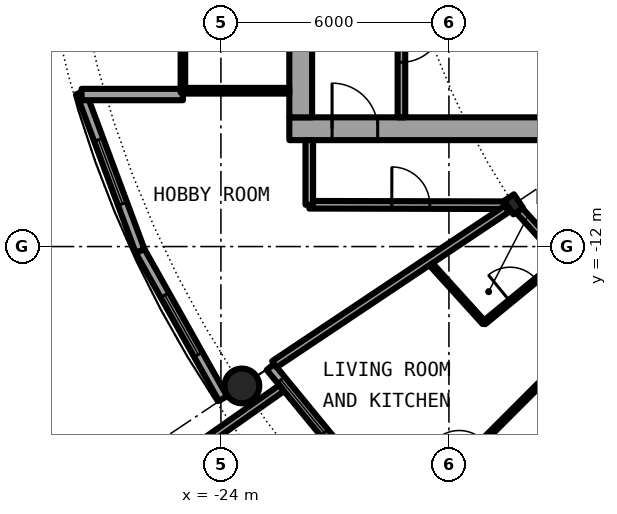
"""IFC4 building model, lengths in metres.
Left out: names, types, materials, properties, quantities, classifications, styles, units other than length and angle.
Written with IfcOpenShell. Run it as: python <this file> out.ifc"""

import sys

from ifc_helpers import new_model, si_unit, direction, frame, frame_2d, origin, origin_2d, place, context, subcontext, project, spatial, rectangle, hollow_circle, i_section, extrude, element, fill, save


model = new_model("IFC4")
c1 = context("Model", 3, precision=1e-05, world=origin(), true_north=direction((0.0, 1.0)))
c2 = subcontext(c1, "Body", "Model", "MODEL_VIEW")
j1 = project(units=[si_unit("LENGTHUNIT", "METRE"), si_unit("PLANEANGLEUNIT", "RADIAN")], contexts=[c1])
p1 = place(None, origin())
s1 = spatial("IfcSite", under=j1, at=p1, CompositionType="ELEMENT")
p2 = place(p1, origin())
s2 = spatial("IfcBuilding", under=s1, at=p2, CompositionType="ELEMENT")
p3 = place(p2, frame((0.0, 0.0, 117.75)))
s3 = spatial("IfcBuildingStorey", under=s2, at=p3, CompositionType="ELEMENT", Elevation=117.75)
p4 = place(p3, frame((-23.448, -15.667, 0.0), z_axis=(0.0, 0.0, 1.0), x_axis=(1.0, 0.0, 0.0)))
e1 = element("IfcColumn", 1, at=p4, inside=s3, PredefinedType="COLUMN", context=c2, shape_type="SweptSolid", body=[
    extrude(hollow_circle(Radius=0.457, WallThickness=0.04, at=origin_2d()), origin(), (0.0, 0.0, 1.0), 3.05),
])
p5 = place(p3, frame((-16.297, -10.889, 0.0), z_axis=(0.0, 0.0, 1.0), x_axis=(-0.831469612303, -0.55557023302, 0.0)))
e2 = element("IfcColumn", 2, at=p5, inside=s3, PredefinedType="COLUMN", context=c2, shape_type="SweptSolid", body=[
    extrude(i_section(OverallWidth=0.307, OverallDepth=0.432, WebThickness=0.021, FlangeThickness=0.04, FilletRadius=0.027, at=origin_2d()), origin(), (0.0, 0.0, 1.0), 3.05),
])
p6 = place(p3, frame((-22.699, -15.167, 0.0), z_axis=(0.0, 0.0, 1.0), x_axis=(0.634382322723, -0.773019449054, 0.0)))
e3 = element("IfcWall", 3, at=p6, inside=s3, PredefinedType="SOLIDWALL", context=c2, shape_type="SweptSolid", body=[
    extrude(rectangle(XDim=5.352, YDim=0.25, at=frame_2d((2.676, 0.0))), origin(), (0.0, 0.0, 1.0), 2.7),
])
p7 = place(p6, frame((0.441, 0.0, 0.3)))
e4 = element("IfcOpeningElement", 4, at=p7, cuts=e3, PredefinedType="OPENING", context=c2, shape_type="SweptSolid", body=[
    extrude(rectangle(XDim=1.8, YDim=2.1, at=frame_2d((0.9, 1.05))), frame((0.0, 0.135, 0.0), z_axis=(0.0, -1.0, 0.0), x_axis=(1.0, 0.0, 0.0)), (0.0, 0.0, 1.0), 0.27),
])
p8 = place(p6, frame((3.51, 0.0, 0.0)))
e5 = element("IfcOpeningElement", 5, at=p8, cuts=e3, PredefinedType="OPENING", context=c2, shape_type="SweptSolid", body=[
    extrude(rectangle(XDim=1.0, YDim=2.2, at=frame_2d((0.5, 1.1))), frame((0.0, 0.135, 0.0), z_axis=(0.0, -1.0, 0.0), x_axis=(1.0, 0.0, 0.0)), (0.0, 0.0, 1.0), 0.27),
])
p9 = place(p3, frame((-22.402, -15.726, -0.03), z_axis=(0.0, 0.0, 1.0), x_axis=(-0.818275399393, -0.574826383135, 0.0)))
e6 = element("IfcWall", 6, at=p9, inside=s3, PredefinedType="SOLIDWALL", context=c2, shape_type="SweptSolid", body=[
    extrude(rectangle(XDim=2.929, YDim=0.2, at=frame_2d((1.465, 0.0))), origin(), (0.0, 0.0, 1.0), 2.73),
])
p10 = place(p3, frame((-27.682, -7.945, 0.0), z_axis=(0.0, 0.0, 1.0), x_axis=(0.349247811493, -0.937030397675, 0.0)))
e7 = element("IfcWall", 7, at=p10, inside=s3, PredefinedType="SOLIDWALL", context=c2, shape_type="SweptSolid", body=[
    extrude(rectangle(XDim=4.452, YDim=0.25, at=frame_2d((2.226, 0.0))), origin(), (0.0, 0.0, 1.0), 2.7),
])
p11 = place(p10, frame((1.327, 0.0, 0.3)))
e8 = element("IfcOpeningElement", 8, at=p11, cuts=e7, PredefinedType="OPENING", context=c2, shape_type="SweptSolid", body=[
    extrude(rectangle(XDim=1.8, YDim=2.1, at=frame_2d((0.9, 1.05))), frame((0.0, 0.135, 0.0), z_axis=(0.0, -1.0, 0.0), x_axis=(1.0, 0.0, 0.0)), (0.0, 0.0, 1.0), 0.27),
])
p12 = place(p3, frame((-26.127, -12.117, 0.0), z_axis=(0.0, 0.0, 1.0), x_axis=(0.489696356642, -0.871893042919, 0.0)))
e9 = element("IfcWall", 9, at=p12, inside=s3, PredefinedType="SOLIDWALL", context=c2, shape_type="SweptSolid", body=[
    extrude(rectangle(XDim=4.454, YDim=0.25, at=frame_2d((2.227, 0.0))), origin(), (0.0, 0.0, 1.0), 2.7),
])
p13 = place(p12, frame((1.327, 0.0, 0.3)))
e10 = element("IfcOpeningElement", 10, at=p13, cuts=e9, PredefinedType="OPENING", context=c2, shape_type="SweptSolid", body=[
    extrude(rectangle(XDim=1.8, YDim=2.1, at=frame_2d((0.9, 1.05))), frame((0.0, 0.135, 0.0), z_axis=(0.0, -1.0, 0.0), x_axis=(1.0, 0.0, 0.0)), (0.0, 0.0, 1.0), 0.27),
])
p14 = place(p3, frame((-25.0, -8.0, 0.0), z_axis=(0.0, 0.0, 1.0), x_axis=(-1.0, 0.0, 0.0)))
e11 = element("IfcWall", 11, at=p14, inside=s3, PredefinedType="SOLIDWALL", context=c2, shape_type="SweptSolid", body=[
    extrude(rectangle(XDim=2.667, YDim=0.3, at=frame_2d((1.333, 0.0))), origin(), (0.0, 0.0, 1.0), 2.7),
])
p15 = place(p3, frame((-22.2, -8.9, 0.0), z_axis=(0.0, 0.0, 1.0), x_axis=(1.0, 0.0, 0.0)))
e12 = element("IfcWall", 12, at=p15, inside=s3, PredefinedType="SHEAR", context=c2, shape_type="SweptSolid", body=[
    extrude(rectangle(XDim=13.8, YDim=0.6, at=frame_2d((6.9, 0.0))), origin(), (0.0, 0.0, 1.0), 3.05),
])
p16 = place(p15, frame((1.125, 0.0, 0.0)))
e13 = element("IfcOpeningElement", 13, at=p16, cuts=e12, PredefinedType="OPENING", context=c2, shape_type="SweptSolid", body=[
    extrude(rectangle(XDim=1.2, YDim=2.3, at=frame_2d((0.6, 1.15))), frame((0.0, 0.31, 0.0), z_axis=(0.0, -1.0, 0.0), x_axis=(1.0, 0.0, 0.0)), (0.0, 0.0, 1.0), 0.62),
])
p17 = place(p3, frame((-21.9, -8.6, 0.0), z_axis=(0.0, 0.0, 1.0), x_axis=(0.0, 1.0, 0.0)))
e14 = element("IfcWall", 14, at=p17, inside=s3, PredefinedType="SHEAR", context=c2, shape_type="SweptSolid", body=[
    extrude(rectangle(XDim=17.2, YDim=0.6, at=frame_2d((8.6, 0.0))), origin(), (0.0, 0.0, 1.0), 3.05),
])
p18 = place(p17, frame((7.7, 0.0, 0.0)))
e15 = element("IfcOpeningElement", 15, at=p18, cuts=e14, PredefinedType="OPENING", context=c2, shape_type="SweptSolid", body=[
    extrude(rectangle(XDim=1.8, YDim=2.3, at=frame_2d((0.9, 1.15))), frame((0.0, 0.31, 0.0), z_axis=(0.0, -1.0, 0.0), x_axis=(1.0, 0.0, 0.0)), (0.0, 0.0, 1.0), 0.62),
])
p19 = place(p3, frame((-19.25, -1.575, 0.0), z_axis=(0.0, 0.0, 1.0), x_axis=(0.0, -1.0, 0.0)))
e16 = element("IfcWall", 16, at=p19, inside=s3, PredefinedType="SOLIDWALL", context=c2, shape_type="SweptSolid", body=[
    extrude(rectangle(XDim=7.025, YDim=0.2, at=frame_2d((3.513, 0.0))), origin(), (0.0, 0.0, 1.0), 2.7),
])
p20 = place(p19, frame((4.475, 0.0, 0.0)))
e17 = element("IfcOpeningElement", 17, at=p20, cuts=e16, PredefinedType="OPENING", context=c2, shape_type="SweptSolid", body=[
    extrude(rectangle(XDim=1.1, YDim=2.3, at=frame_2d((0.55, 1.15))), frame((0.0, 0.11, 0.0), z_axis=(0.0, -1.0, 0.0), x_axis=(1.0, 0.0, 0.0)), (0.0, 0.0, 1.0), 0.22),
])
p21 = place(p3, frame((-22.2, -7.9, 0.0), z_axis=(0.0, 0.0, 1.0), x_axis=(-1.0, 0.0, 0.0)))
e18 = element("IfcWall", 18, at=p21, inside=s3, PredefinedType="PARTITIONING", context=c2, shape_type="SweptSolid", body=[
    extrude(rectangle(XDim=2.74, YDim=0.15, at=frame_2d((1.37, 0.0))), origin(), (0.0, 0.0, 1.0), 2.7),
])
p22 = place(p3, frame((-25.0, 7.95, 0.0), z_axis=(0.0, 0.0, 1.0), x_axis=(0.0, -1.0, 0.0)))
e19 = element("IfcWall", 19, at=p22, inside=s3, PredefinedType="PARTITIONING", context=c2, shape_type="SweptSolid", body=[
    extrude(rectangle(XDim=15.9, YDim=0.12, at=frame_2d((7.95, 0.0))), origin(), (0.0, 0.0, 1.0), 2.7),
])
p23 = place(p22, frame((0.95, 0.0, 0.1)))
e20 = element("IfcOpeningElement", 20, at=p23, cuts=e19, PredefinedType="OPENING", context=c2, shape_type="SweptSolid", body=[
    extrude(rectangle(XDim=14.0, YDim=2.35, at=frame_2d((7.0, 1.175))), frame((0.0, 0.07, 0.0), z_axis=(0.0, -1.0, 0.0), x_axis=(1.0, 0.0, 0.0)), (0.0, 0.0, 1.0), 0.14),
])
p24 = place(p3, frame((-18.542, -12.389, 0.0), z_axis=(0.0, 0.0, 1.0), x_axis=(0.671396556615, -0.741098282123, 0.0)))
e21 = element("IfcWall", 21, at=p24, inside=s3, PredefinedType="PARTITIONING", context=c2, shape_type="SweptSolid", body=[
    extrude(rectangle(XDim=2.182, YDim=0.1, at=frame_2d((1.091, 0.0))), origin(), (0.0, 0.0, 1.0), 2.7),
])
p25 = place(p3, frame((-16.192, -11.004, 0.0), z_axis=(0.0, 0.0, 1.0), x_axis=(0.671481997275, -0.741020868354, 0.0)))
e22 = element("IfcWall", 22, at=p25, inside=s3, PredefinedType="PARTITIONING", context=c2, shape_type="SweptSolid", body=[
    extrude(rectangle(XDim=5.596, YDim=0.2, at=frame_2d((2.798, 0.0))), origin(), (0.0, 0.0, 1.0), 2.39),
])
p26 = place(p25, frame((3.179, 0.0, 0.0)))
e23 = element("IfcOpeningElement", 23, at=p26, cuts=e22, PredefinedType="OPENING", context=c2, shape_type="SweptSolid", body=[
    extrude(rectangle(XDim=1.0, YDim=2.3, at=frame_2d((0.5, 1.15))), frame((0.0, 0.11, 0.0), z_axis=(0.0, -1.0, 0.0), x_axis=(1.0, 0.0, 0.0)), (0.0, 0.0, 1.0), 0.22),
])
p27 = place(p3, frame((-21.675, -10.9, 0.0), z_axis=(0.0, 0.0, 1.0), x_axis=(0.999997173357, -0.002377662213, 0.0)))
e24 = element("IfcWall", 24, at=p27, inside=s3, PredefinedType="PARTITIONING", context=c2, shape_type="SweptSolid", body=[
    extrude(rectangle(XDim=5.134, YDim=0.2, at=frame_2d((2.567, 0.0))), origin(), (0.0, 0.0, 1.0), 2.7),
])
p28 = place(p27, frame((2.171, 0.0, 0.0)))
e25 = element("IfcOpeningElement", 25, at=p28, cuts=e24, PredefinedType="OPENING", context=c2, shape_type="SweptSolid", body=[
    extrude(rectangle(XDim=1.0, YDim=2.3, at=frame_2d((0.5, 1.15))), frame((0.0, 0.11, 0.0), z_axis=(0.0, -1.0, 0.0), x_axis=(1.0, 0.0, 0.0)), (0.0, 0.0, 1.0), 0.22),
])
p29 = place(p3, frame((-22.595, -15.097, 0.0), z_axis=(0.0, 0.0, 1.0), x_axis=(0.831467903109, 0.555572791, 0.0)))
e26 = element("IfcWall", 26, at=p29, inside=s3, PredefinedType="PARTITIONING", context=c2, shape_type="SweptSolid", body=[
    extrude(rectangle(XDim=7.358, YDim=0.2, at=frame_2d((3.679, 0.0))), origin(), (0.0, 0.0, 1.0), 2.7),
])
p30 = place(p3, frame((-19.21, -19.222, 0.0), z_axis=(0.0, 0.0, 1.0), x_axis=(0.706914880313, 0.707298629994, 0.0)))
e27 = element("IfcWall", 27, at=p30, inside=s3, PredefinedType="PARTITIONING", context=c2, shape_type="SweptSolid", body=[
    extrude(rectangle(XDim=5.09, YDim=0.1, at=frame_2d((2.545, 0.0))), origin(), (0.0, 0.0, 1.0), 2.7),
])
p31 = place(p30, frame((2.095, 0.0, 0.0)))
e28 = element("IfcOpeningElement", 28, at=p31, cuts=e27, PredefinedType="OPENING", context=c2, shape_type="SweptSolid", body=[
    extrude(rectangle(XDim=0.9, YDim=2.3, at=frame_2d((0.45, 1.15))), frame((0.0, 0.06, 0.0), z_axis=(0.0, -1.0, 0.0), x_axis=(1.0, 0.0, 0.0)), (0.0, 0.0, 1.0), 0.12),
])
p32 = place(p3, frame((-17.24, -21.007, 0.0), z_axis=(0.0, 0.0, 1.0), x_axis=(0.634381303318, 0.773020285633, 0.0)))
e29 = element("IfcWall", 29, at=p32, inside=s3, PredefinedType="PARTITIONING", context=c2, shape_type="SweptSolid", body=[
    extrude(rectangle(XDim=7.576, YDim=0.2, at=frame_2d((3.788, 0.0))), origin(), (0.0, 0.0, 1.0), 2.7),
])
p33 = place(p3, frame((-17.077, -14.006, 0.0), z_axis=(0.0, 0.0, 1.0), x_axis=(0.77319617123, 0.634166918717, 0.0)))
e30 = element("IfcWall", 30, at=p33, inside=s3, PredefinedType="PARTITIONING", context=c2, shape_type="SweptSolid", body=[
    extrude(rectangle(XDim=2.675, YDim=0.1, at=frame_2d((1.337, 0.0))), origin(), (0.0, 0.0, 1.0), 2.7),
])
p34 = place(p33, frame((0.887, 0.0, 0.0)))
e31 = element("IfcOpeningElement", 31, at=p34, cuts=e30, PredefinedType="OPENING", context=c2, shape_type="SweptSolid", body=[
    extrude(rectangle(XDim=0.9, YDim=2.3, at=frame_2d((0.45, 1.15))), frame((0.0, 0.06, 0.0), z_axis=(0.0, -1.0, 0.0), x_axis=(1.0, 0.0, 0.0)), (0.0, 0.0, 1.0), 0.12),
])
p35 = place(p3, frame((-21.675, -10.9, 0.0), z_axis=(0.0, 0.0, 1.0), x_axis=(0.0, 1.0, 0.0)))
e32 = element("IfcWall", 32, at=p35, inside=s3, PredefinedType="PARTITIONING", context=c2, shape_type="SweptSolid", body=[
    extrude(rectangle(XDim=1.7, YDim=0.2, at=frame_2d((0.85, 0.0))), origin(), (0.0, 0.0, 1.0), 2.7),
])
p36 = place(p7, origin())
e33 = element("IfcWindow", 33, at=p36, inside=s3, PartitioningType="SINGLE_PANEL", PredefinedType="WINDOW", context=c2, shape_type="SweptSolid", body=[
    extrude(rectangle(XDim=1.8, YDim=2.1, at=frame_2d((0.9, 1.05))), frame((0.0, 0.03, 0.0), z_axis=(0.0, -1.0, 0.0), x_axis=(1.0, 0.0, 0.0)), (0.0, 0.0, 1.0), 0.06),
])
fill(e4, e33)
p37 = place(p11, origin())
e34 = element("IfcWindow", 34, at=p37, inside=s3, PartitioningType="SINGLE_PANEL", PredefinedType="WINDOW", context=c2, shape_type="SweptSolid", body=[
    extrude(rectangle(XDim=1.8, YDim=2.1, at=frame_2d((0.9, 1.05))), frame((0.0, 0.03, 0.0), z_axis=(0.0, -1.0, 0.0), x_axis=(1.0, 0.0, 0.0)), (0.0, 0.0, 1.0), 0.06),
])
fill(e8, e34)
p38 = place(p13, origin())
e35 = element("IfcWindow", 35, at=p38, inside=s3, PartitioningType="SINGLE_PANEL", PredefinedType="WINDOW", context=c2, shape_type="SweptSolid", body=[
    extrude(rectangle(XDim=1.8, YDim=2.1, at=frame_2d((0.9, 1.05))), frame((0.0, 0.03, 0.0), z_axis=(0.0, -1.0, 0.0), x_axis=(1.0, 0.0, 0.0)), (0.0, 0.0, 1.0), 0.06),
])
fill(e10, e35)
p39 = place(p20, origin())
e36 = element("IfcDoor", 36, at=p39, inside=s3, OperationType="SINGLE_SWING_LEFT", PredefinedType="DOOR", context=c2, shape_type="SweptSolid", body=[
    extrude(rectangle(XDim=1.1, YDim=2.3, at=frame_2d((0.55, 1.15))), frame((0.0, 0.025, 0.0), z_axis=(0.0, -1.0, 0.0), x_axis=(1.0, 0.0, 0.0)), (0.0, 0.0, 1.0), 0.05),
])
fill(e17, e36)
p40 = place(p16, origin())
e37 = element("IfcDoor", 37, at=p40, inside=s3, OperationType="SINGLE_SWING_RIGHT", PredefinedType="DOOR", context=c2, shape_type="SweptSolid", body=[
    extrude(rectangle(XDim=1.2, YDim=2.3, at=frame_2d((0.6, 1.15))), frame((0.0, 0.025, 0.0), z_axis=(0.0, -1.0, 0.0), x_axis=(1.0, 0.0, 0.0)), (0.0, 0.0, 1.0), 0.05),
])
fill(e13, e37)
p41 = place(p23, origin())
e38 = element("IfcWindow", 38, at=p41, inside=s3, PartitioningType="SINGLE_PANEL", PredefinedType="WINDOW", context=c2, shape_type="SweptSolid", body=[
    extrude(rectangle(XDim=14.0, YDim=2.35, at=frame_2d((7.0, 1.175))), frame((0.0, 0.03, 0.0), z_axis=(0.0, -1.0, 0.0), x_axis=(1.0, 0.0, 0.0)), (0.0, 0.0, 1.0), 0.06),
])
fill(e20, e38)
p42 = place(p34, origin())
e39 = element("IfcDoor", 39, at=p42, inside=s3, OperationType="SINGLE_SWING_LEFT", PredefinedType="DOOR", context=c2, shape_type="SweptSolid", body=[
    extrude(rectangle(XDim=0.9, YDim=2.3, at=frame_2d((0.45, 1.15))), frame((0.0, 0.025, 0.0), z_axis=(0.0, -1.0, 0.0), x_axis=(1.0, 0.0, 0.0)), (0.0, 0.0, 1.0), 0.05),
])
fill(e31, e39)
p43 = place(p28, origin())
e40 = element("IfcDoor", 40, at=p43, inside=s3, OperationType="SINGLE_SWING_RIGHT", PredefinedType="DOOR", context=c2, shape_type="SweptSolid", body=[
    extrude(rectangle(XDim=1.0, YDim=2.3, at=frame_2d((0.5, 1.15))), frame((0.0, 0.025, 0.0), z_axis=(0.0, -1.0, 0.0), x_axis=(1.0, 0.0, 0.0)), (0.0, 0.0, 1.0), 0.05),
])
fill(e25, e40)
save(model, sys.argv[1])
